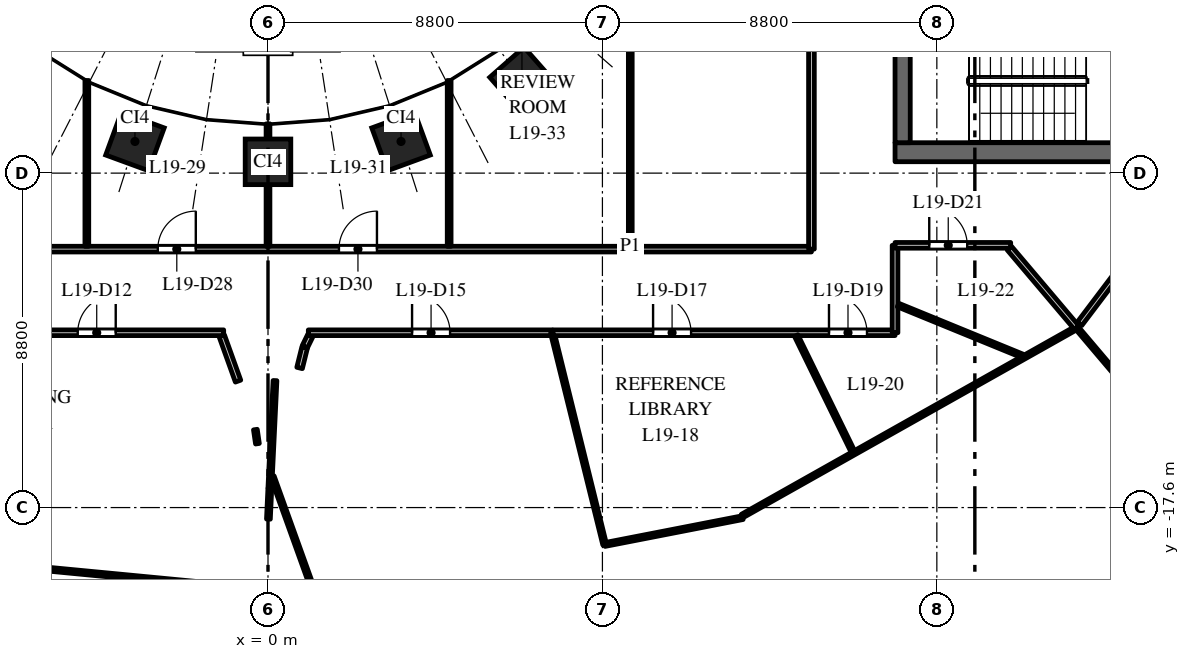
"""IFC4 building model, lengths in metres.
Left out: names, types, materials, properties, quantities, classifications, styles, units other than length and angle.
Written with IfcOpenShell. Run it as: python <this file> out.ifc"""

import sys

from ifc_helpers import new_model, si_unit, direction, frame, frame_2d, origin, origin_2d, place, context, subcontext, project, spatial, rectangle, extrude, element, fill, save


model = new_model("IFC4")
c1 = context("Model", 3, precision=1e-05, world=origin(), true_north=direction((0.0, 1.0)))
c2 = subcontext(c1, "Body", "Model", "MODEL_VIEW")
j1 = project(units=[si_unit("LENGTHUNIT", "METRE"), si_unit("PLANEANGLEUNIT", "RADIAN")], contexts=[c1])
p1 = place(None, origin())
s1 = spatial("IfcSite", under=j1, at=p1, CompositionType="ELEMENT")
p2 = place(p1, origin())
s2 = spatial("IfcBuilding", under=s1, at=p2, CompositionType="ELEMENT")
p3 = place(p2, frame((0.0, 0.0, 88.0)))
s3 = spatial("IfcBuildingStorey", under=s2, at=p3, CompositionType="ELEMENT", Elevation=88.0)
for number, where, z_axis, x_axis in (
    (1, (-3.501, -7.967, 0.0), (0.0, 0.0, 1.0), (0.939, -0.344, 0.0)),
    (2, (0.0, -8.503, 0.0), (0.0, 0.0, 1.0), (1.0, 0.0, 0.0)),
    (3, (3.501, -7.967, 0.0), (0.0, 0.0, 1.0), (0.939, 0.344, 0.0)),
    (4, (6.682, -6.334, 0.0), (0.0, 0.0, 1.0), (0.751, 0.66, 0.0)),
):
    element("IfcColumn", number, at=place(p3, frame(where, z_axis=z_axis, x_axis=x_axis)), inside=s3, PredefinedType="COLUMN", context=c2, shape_type="SweptSolid", body=[
        extrude(rectangle(XDim=1.2, YDim=1.2, at=origin_2d()), origin(), (0.0, 0.0, 1.0), 4.0),
    ])
p4 = place(p3, frame((16.5, -8.25, 0.0), z_axis=(0.0, 0.0, 1.0), x_axis=(1.0, 0.0, 0.0)))
e5 = element("IfcWall", 5, at=p4, inside=s3, PredefinedType="SHEAR", context=c2, shape_type="SweptSolid", body=[
    extrude(rectangle(XDim=15.0, YDim=0.5, at=frame_2d((7.5, 0.0))), origin(), (0.0, 0.0, 1.0), 3.7),
])
p5 = place(p4, frame((6.9, 0.0, 0.0)))
e6 = element("IfcOpeningElement", 6, at=p5, cuts=e5, PredefinedType="OPENING", context=c2, shape_type="SweptSolid", body=[
    extrude(rectangle(XDim=1.2, YDim=2.1, at=frame_2d((0.6, 1.05))), frame((0.0, 0.26, 0.0), z_axis=(0.0, -1.0, 0.0), x_axis=(1.0, 0.0, 0.0)), (0.0, 0.0, 1.0), 0.52),
])
p6 = place(p4, frame((12.275, 0.0, 0.0)))
e7 = element("IfcOpeningElement", 7, at=p6, cuts=e5, PredefinedType="OPENING", context=c2, shape_type="SweptSolid", body=[
    extrude(rectangle(XDim=0.9, YDim=2.1, at=frame_2d((0.45, 1.05))), frame((0.0, 0.26, 0.0), z_axis=(0.0, -1.0, 0.0), x_axis=(1.0, 0.0, 0.0)), (0.0, 0.0, 1.0), 0.52),
])
p7 = place(p3, frame((16.7, -8.0, 0.0), z_axis=(0.0, 0.0, 1.0), x_axis=(0.0, 1.0, 0.0)))
e8 = element("IfcWall", 8, at=p7, inside=s3, PredefinedType="SHEAR", context=c2, shape_type="SweptSolid", body=[
    extrude(rectangle(XDim=16.0, YDim=0.4, at=frame_2d((8.0, 0.0))), origin(), (0.0, 0.0, 1.0), 3.7),
])
p8 = place(p3, frame((-14.3, -10.8, 0.0), z_axis=(0.0, 0.0, 1.0), x_axis=(1.0, 0.0, 0.0)))
e9 = element("IfcWall", 9, at=p8, inside=s3, PredefinedType="PARTITIONING", context=c2, shape_type="SweptSolid", body=[
    extrude(rectangle(XDim=28.6, YDim=0.15, at=frame_2d((14.3, 0.0))), origin(), (0.0, 0.0, 1.0), 2.85),
])
p9 = place(p8, frame((11.4, 0.0, 0.0)))
e10 = element("IfcOpeningElement", 10, at=p9, cuts=e9, PredefinedType="OPENING", context=c2, shape_type="SweptSolid", body=[
    extrude(rectangle(XDim=1.0, YDim=2.1, at=frame_2d((0.5, 1.05))), frame((0.0, 0.085, 0.0), z_axis=(0.0, -1.0, 0.0), x_axis=(1.0, 0.0, 0.0)), (0.0, 0.0, 1.0), 0.17),
])
p10 = place(p8, frame((16.167, 0.0, 0.0)))
e11 = element("IfcOpeningElement", 11, at=p10, cuts=e9, PredefinedType="OPENING", context=c2, shape_type="SweptSolid", body=[
    extrude(rectangle(XDim=1.0, YDim=2.1, at=frame_2d((0.5, 1.05))), frame((0.0, 0.085, 0.0), z_axis=(0.0, -1.0, 0.0), x_axis=(1.0, 0.0, 0.0)), (0.0, 0.0, 1.0), 0.17),
])
p11 = place(p3, frame((-8.802, -18.932, 0.0), z_axis=(0.0, 0.0, 1.0), x_axis=(0.99543910623, -0.095399086939, 0.0)))
e12 = element("IfcWall", 12, at=p11, inside=s3, PredefinedType="PARTITIONING", context=c2, shape_type="SweptSolid", body=[
    extrude(rectangle(XDim=8.24, YDim=0.1, at=frame_2d((4.12, 0.0))), origin(), (0.0, 0.0, 1.0), 2.85),
])
p12 = place(p3, frame((-7.767, -13.0, 0.0), z_axis=(0.0, 0.0, 1.0), x_axis=(1.0, 0.0, 0.0)))
e13 = element("IfcWall", 13, at=p12, inside=s3, PredefinedType="PARTITIONING", context=c2, shape_type="SweptSolid", body=[
    extrude(rectangle(XDim=6.601, YDim=0.15, at=frame_2d((3.301, 0.0))), origin(), (0.0, 0.0, 1.0), 2.85),
])
p13 = place(p12, frame((2.76, 0.0, 0.0)))
e14 = element("IfcOpeningElement", 14, at=p13, cuts=e13, PredefinedType="OPENING", context=c2, shape_type="SweptSolid", body=[
    extrude(rectangle(XDim=1.0, YDim=2.1, at=frame_2d((0.5, 1.05))), frame((0.0, 0.085, 0.0), z_axis=(0.0, -1.0, 0.0), x_axis=(1.0, 0.0, 0.0)), (0.0, 0.0, 1.0), 0.17),
])
p14 = place(p3, frame((-4.767, -10.725, 0.0), z_axis=(0.0, 0.0, 1.0), x_axis=(0.0, 1.0, 0.0)))
e15 = element("IfcWall", 15, at=p14, inside=s3, PredefinedType="PARTITIONING", context=c2, shape_type="SweptSolid", body=[
    extrude(rectangle(XDim=4.362, YDim=0.1, at=frame_2d((2.181, 0.0))), origin(), (0.0, 0.0, 1.0), 2.9),
])
p15 = place(p3, frame((-1.217, -13.079, 0.0), z_axis=(0.0, 0.0, 1.0), x_axis=(0.338140136535, -0.941095769868, 0.0)))
e16 = element("IfcWall", 16, at=p15, inside=s3, PredefinedType="PARTITIONING", context=c2, shape_type="SweptSolid", body=[
    extrude(rectangle(XDim=1.269, YDim=0.15, at=frame_2d((0.634, 0.0))), origin(), (0.0, 0.0, 1.0), 2.85),
])
p16 = place(p3, frame((-0.332, -15.548, 0.0), z_axis=(0.0, 0.0, 1.0), x_axis=(0.143604317757, -0.989635185269, 0.0)))
e17 = element("IfcWall", 17, at=p16, inside=s3, PredefinedType="PARTITIONING", context=c2, shape_type="SweptSolid", body=[
    extrude(rectangle(XDim=0.376, YDim=0.1, at=frame_2d((0.188, 0.0))), origin(), (0.0, 0.0, 1.0), 3.7),
])
p17 = place(p3, frame((0.0, -10.725, 0.0), z_axis=(0.0, 0.0, 1.0), x_axis=(0.0, 1.0, 0.0)))
e18 = element("IfcWall", 18, at=p17, inside=s3, PredefinedType="PARTITIONING", context=c2, shape_type="SweptSolid", body=[
    extrude(rectangle(XDim=3.221, YDim=0.1, at=frame_2d((1.611, 0.0))), origin(), (0.0, 0.0, 1.0), 3.7),
])
p18 = place(p3, frame((0.011, -17.904, 0.0), z_axis=(0.0, 0.0, 1.0), x_axis=(0.046221474857, 0.998931216482, 0.0)))
e19 = element("IfcWall", 19, at=p18, inside=s3, PredefinedType="PARTITIONING", context=c2, shape_type="SweptSolid", body=[
    extrude(rectangle(XDim=0.803, YDim=0.1, at=frame_2d((0.401, 0.0))), origin(), (0.0, 0.0, 1.0), 3.7),
])
p19 = place(p3, frame((0.049, -17.087, 0.0), z_axis=(0.0, 0.0, 1.0), x_axis=(0.047688063475, 0.998862277094, 0.0)))
e20 = element("IfcWall", 20, at=p19, inside=s3, PredefinedType="PARTITIONING", context=c2, shape_type="SweptSolid", body=[
    extrude(rectangle(XDim=2.831, YDim=0.1, at=frame_2d((1.416, 0.0))), origin(), (0.0, 0.0, 1.0), 3.7),
])
p20 = place(p3, frame((0.113, -16.782, 0.0), z_axis=(0.0, 0.0, 1.0), x_axis=(0.338468220543, -0.940977823162, 0.0)))
e21 = element("IfcWall", 21, at=p20, inside=s3, PredefinedType="PARTITIONING", context=c2, shape_type="SweptSolid", body=[
    extrude(rectangle(XDim=5.265, YDim=0.1, at=frame_2d((2.632, 0.0))), origin(), (0.0, 0.0, 1.0), 3.7),
])
p21 = place(p3, frame((0.831, -13.927, 0.0), z_axis=(0.0, 0.0, 1.0), x_axis=(0.240473799965, 0.970655629732, 0.0)))
e22 = element("IfcWall", 22, at=p21, inside=s3, PredefinedType="PARTITIONING", context=c2, shape_type="SweptSolid", body=[
    extrude(rectangle(XDim=0.557, YDim=0.15, at=frame_2d((0.279, 0.0))), origin(), (0.0, 0.0, 1.0), 3.7),
])
p22 = place(p3, frame((0.969, -13.369, 0.0), z_axis=(0.0, 0.0, 1.0), x_axis=(0.440240923942, 0.897879685084, 0.0)))
e23 = element("IfcWall", 23, at=p22, inside=s3, PredefinedType="PARTITIONING", context=c2, shape_type="SweptSolid", body=[
    extrude(rectangle(XDim=0.323, YDim=0.15, at=frame_2d((0.161, 0.0))), origin(), (0.0, 0.0, 1.0), 3.7),
])
p23 = place(p3, frame((1.061, -13.0, 0.0), z_axis=(0.0, 0.0, 1.0), x_axis=(1.0, 0.0, 0.0)))
e24 = element("IfcWall", 24, at=p23, inside=s3, PredefinedType="PARTITIONING", context=c2, shape_type="SweptSolid", body=[
    extrude(rectangle(XDim=6.422, YDim=0.15, at=frame_2d((3.211, 0.0))), origin(), (0.0, 0.0, 1.0), 2.85),
])
p24 = place(p23, frame((2.73, 0.0, 0.0)))
e25 = element("IfcOpeningElement", 25, at=p24, cuts=e24, PredefinedType="OPENING", context=c2, shape_type="SweptSolid", body=[
    extrude(rectangle(XDim=1.0, YDim=2.1, at=frame_2d((0.5, 1.05))), frame((0.0, 0.085, 0.0), z_axis=(0.0, -1.0, 0.0), x_axis=(1.0, 0.0, 0.0)), (0.0, 0.0, 1.0), 0.17),
])
p25 = place(p3, frame((4.767, -10.725, 0.0), z_axis=(0.0, 0.0, 1.0), x_axis=(0.0, 1.0, 0.0)))
e26 = element("IfcWall", 26, at=p25, inside=s3, PredefinedType="PARTITIONING", context=c2, shape_type="SweptSolid", body=[
    extrude(rectangle(XDim=4.362, YDim=0.1, at=frame_2d((2.181, 0.0))), origin(), (0.0, 0.0, 1.0), 2.85),
])
p26 = place(p3, frame((7.483, -13.0, 0.0), z_axis=(0.0, 0.0, 1.0), x_axis=(0.239702552944, -0.970846376165, 0.0)))
e27 = element("IfcWall", 27, at=p26, inside=s3, PredefinedType="PARTITIONING", context=c2, shape_type="SweptSolid", body=[
    extrude(rectangle(XDim=5.74, YDim=0.1, at=frame_2d((2.87, 0.0))), origin(), (0.0, 0.0, 1.0), 3.7),
])
p27 = place(p3, frame((7.499, -13.0, 0.0), z_axis=(0.0, 0.0, 1.0), x_axis=(1.0, 0.0, 0.0)))
e28 = element("IfcWall", 28, at=p27, inside=s3, PredefinedType="PARTITIONING", context=c2, shape_type="SweptSolid", body=[
    extrude(rectangle(XDim=9.001, YDim=0.15, at=frame_2d((4.5, 0.0))), origin(), (0.0, 0.0, 1.0), 2.85),
])
p28 = place(p27, frame((2.634, 0.0, 0.0)))
e29 = element("IfcOpeningElement", 29, at=p28, cuts=e28, PredefinedType="OPENING", context=c2, shape_type="SweptSolid", body=[
    extrude(rectangle(XDim=1.0, YDim=2.1, at=frame_2d((0.5, 1.05))), frame((0.0, 0.085, 0.0), z_axis=(0.0, -1.0, 0.0), x_axis=(1.0, 0.0, 0.0)), (0.0, 0.0, 1.0), 0.17),
])
p29 = place(p27, frame((7.263, 0.0, 0.0)))
e30 = element("IfcOpeningElement", 30, at=p29, cuts=e28, PredefinedType="OPENING", context=c2, shape_type="SweptSolid", body=[
    extrude(rectangle(XDim=1.0, YDim=2.1, at=frame_2d((0.5, 1.05))), frame((0.0, 0.085, 0.0), z_axis=(0.0, -1.0, 0.0), x_axis=(1.0, 0.0, 0.0)), (0.0, 0.0, 1.0), 0.17),
])
p30 = place(p3, frame((8.859, -18.573, 0.0), z_axis=(0.0, 0.0, 1.0), x_axis=(0.981554610727, 0.191181971328, 0.0)))
e31 = element("IfcWall", 31, at=p30, inside=s3, PredefinedType="PARTITIONING", context=c2, shape_type="SweptSolid", body=[
    extrude(rectangle(XDim=3.703, YDim=0.1, at=frame_2d((1.852, 0.0))), origin(), (0.0, 0.0, 1.0), 2.85),
])
p31 = place(p3, frame((9.533, -10.725, 0.0), z_axis=(0.0, 0.0, 1.0), x_axis=(0.0, 1.0, 0.0)))
e32 = element("IfcWall", 32, at=p31, inside=s3, PredefinedType="PARTITIONING", context=c2, shape_type="SweptSolid", body=[
    extrude(rectangle(XDim=21.45, YDim=0.1, at=frame_2d((10.725, 0.0))), origin(), (0.0, 0.0, 1.0), 2.75),
])
p32 = place(p3, frame((12.478, -17.822, 0.0), z_axis=(0.0, 0.0, 1.0), x_axis=(0.871366973315, 0.490631835306, 0.0)))
e33 = element("IfcWall", 33, at=p32, inside=s3, PredefinedType="PARTITIONING", context=c2, shape_type="SweptSolid", body=[
    extrude(rectangle(XDim=10.101, YDim=0.1, at=frame_2d((5.051, 0.0))), origin(), (0.0, 0.0, 1.0), 3.7),
])
p33 = place(p3, frame((13.899, -13.075, 0.0), z_axis=(0.0, 0.0, 1.0), x_axis=(0.439170148288, -0.898403907412, 0.0)))
e34 = element("IfcWall", 34, at=p33, inside=s3, PredefinedType="PARTITIONING", context=c2, shape_type="SweptSolid", body=[
    extrude(rectangle(XDim=3.395, YDim=0.1, at=frame_2d((1.698, 0.0))), origin(), (0.0, 0.0, 1.0), 3.7),
])
p34 = place(p3, frame((14.3, -10.8, 0.0), z_axis=(0.0, 0.0, 1.0), x_axis=(0.0, 1.0, 0.0)))
e35 = element("IfcWall", 35, at=p34, inside=s3, PredefinedType="PARTITIONING", context=c2, shape_type="SweptSolid", body=[
    extrude(rectangle(XDim=21.6, YDim=0.15, at=frame_2d((10.8, 0.0))), origin(), (0.0, 0.0, 1.0), 2.75),
])
p35 = place(p34, frame((10.2, 0.0, 0.0)))
e36 = element("IfcOpeningElement", 36, at=p35, cuts=e35, PredefinedType="OPENING", context=c2, shape_type="SweptSolid", body=[
    extrude(rectangle(XDim=1.0, YDim=2.1, at=frame_2d((0.5, 1.05))), frame((0.0, 0.085, 0.0), z_axis=(0.0, -1.0, 0.0), x_axis=(1.0, 0.0, 0.0)), (0.0, 0.0, 1.0), 0.17),
])
p36 = place(p3, frame((16.5, -13.0, 0.0), z_axis=(0.0, 0.0, 1.0), x_axis=(0.0, 1.0, 0.0)))
e37 = element("IfcWall", 37, at=p36, inside=s3, PredefinedType="PARTITIONING", context=c2, shape_type="SweptSolid", body=[
    extrude(rectangle(XDim=2.3, YDim=0.15, at=frame_2d((1.15, 0.0))), origin(), (0.0, 0.0, 1.0), 3.7),
])
p37 = place(p3, frame((16.5, -10.7, 0.0), z_axis=(0.0, 0.0, 1.0), x_axis=(1.0, 0.0, 0.0)))
e38 = element("IfcWall", 38, at=p37, inside=s3, PredefinedType="PARTITIONING", context=c2, shape_type="SweptSolid", body=[
    extrude(rectangle(XDim=3.043, YDim=0.15, at=frame_2d((1.521, 0.0))), origin(), (0.0, 0.0, 1.0), 3.7),
])
p38 = place(p37, frame((0.9, 0.0, 0.0)))
e39 = element("IfcOpeningElement", 39, at=p38, cuts=e38, PredefinedType="OPENING", context=c2, shape_type="SweptSolid", body=[
    extrude(rectangle(XDim=1.0, YDim=2.1, at=frame_2d((0.5, 1.05))), frame((0.0, 0.085, 0.0), z_axis=(0.0, -1.0, 0.0), x_axis=(1.0, 0.0, 0.0)), (0.0, 0.0, 1.0), 0.17),
])
p39 = place(p3, frame((16.579, -12.271, 0.0), z_axis=(0.0, 0.0, 1.0), x_axis=(0.925511782592, -0.378718814272, 0.0)))
e40 = element("IfcWall", 40, at=p39, inside=s3, PredefinedType="PARTITIONING", context=c2, shape_type="SweptSolid", body=[
    extrude(rectangle(XDim=3.539, YDim=0.1, at=frame_2d((1.769, 0.0))), origin(), (0.0, 0.0, 1.0), 3.7),
])
p40 = place(p3, frame((19.511, -10.778, 0.0), z_axis=(0.0, 0.0, 1.0), x_axis=(0.64641426768, -0.762986628021, 0.0)))
e41 = element("IfcWall", 41, at=p40, inside=s3, PredefinedType="PARTITIONING", context=c2, shape_type="SweptSolid", body=[
    extrude(rectangle(XDim=2.735, YDim=0.15, at=frame_2d((1.368, 0.0))), origin(), (0.0, 0.0, 1.0), 3.7),
])
p41 = place(p3, frame((21.355, -12.765, 0.0), z_axis=(0.0, 0.0, 1.0), x_axis=(0.603391001626, 0.797445483502, 0.0)))
e42 = element("IfcWall", 42, at=p41, inside=s3, PredefinedType="PARTITIONING", context=c2, shape_type="SweptSolid", body=[
    extrude(rectangle(XDim=2.68, YDim=0.15, at=frame_2d((1.34, 0.0))), origin(), (0.0, 0.0, 1.0), 2.75),
])
p42 = place(p3, frame((21.279, -12.865, 0.0), z_axis=(0.0, 0.0, 1.0), x_axis=(0.646395355102, -0.763002650652, 0.0)))
e43 = element("IfcWall", 43, at=p42, inside=s3, PredefinedType="PARTITIONING", context=c2, shape_type="SweptSolid", body=[
    extrude(rectangle(XDim=7.969, YDim=0.1, at=frame_2d((3.984, 0.0))), origin(), (0.0, 0.0, 1.0), 2.9),
])
p43 = place(p13, origin())
e44 = element("IfcDoor", 44, at=p43, inside=s3, OperationType="SINGLE_SWING_RIGHT", PredefinedType="DOOR", context=c2, shape_type="SweptSolid", body=[
    extrude(rectangle(XDim=1.0, YDim=2.1, at=frame_2d((0.5, 1.05))), frame((0.0, 0.025, 0.0), z_axis=(0.0, -1.0, 0.0), x_axis=(1.0, 0.0, 0.0)), (0.0, 0.0, 1.0), 0.05),
])
fill(e14, e44)
p44 = place(p24, origin())
e45 = element("IfcDoor", 45, at=p44, inside=s3, OperationType="SINGLE_SWING_LEFT", PredefinedType="DOOR", context=c2, shape_type="SweptSolid", body=[
    extrude(rectangle(XDim=1.0, YDim=2.1, at=frame_2d((0.5, 1.05))), frame((0.0, 0.025, 0.0), z_axis=(0.0, -1.0, 0.0), x_axis=(1.0, 0.0, 0.0)), (0.0, 0.0, 1.0), 0.05),
])
fill(e25, e45)
p45 = place(p28, origin())
e46 = element("IfcDoor", 46, at=p45, inside=s3, OperationType="SINGLE_SWING_LEFT", PredefinedType="DOOR", context=c2, shape_type="SweptSolid", body=[
    extrude(rectangle(XDim=1.0, YDim=2.1, at=frame_2d((0.5, 1.05))), frame((0.0, 0.025, 0.0), z_axis=(0.0, -1.0, 0.0), x_axis=(1.0, 0.0, 0.0)), (0.0, 0.0, 1.0), 0.05),
])
fill(e29, e46)
p46 = place(p29, origin())
e47 = element("IfcDoor", 47, at=p46, inside=s3, OperationType="SINGLE_SWING_LEFT", PredefinedType="DOOR", context=c2, shape_type="SweptSolid", body=[
    extrude(rectangle(XDim=1.0, YDim=2.1, at=frame_2d((0.5, 1.05))), frame((0.0, 0.025, 0.0), z_axis=(0.0, -1.0, 0.0), x_axis=(1.0, 0.0, 0.0)), (0.0, 0.0, 1.0), 0.05),
])
fill(e30, e47)
p47 = place(p38, origin())
e48 = element("IfcDoor", 48, at=p47, inside=s3, OperationType="SINGLE_SWING_LEFT", PredefinedType="DOOR", context=c2, shape_type="SweptSolid", body=[
    extrude(rectangle(XDim=1.0, YDim=2.1, at=frame_2d((0.5, 1.05))), frame((0.0, 0.025, 0.0), z_axis=(0.0, -1.0, 0.0), x_axis=(1.0, 0.0, 0.0)), (0.0, 0.0, 1.0), 0.05),
])
fill(e39, e48)
p48 = place(p9, origin())
e49 = element("IfcDoor", 49, at=p48, inside=s3, OperationType="SINGLE_SWING_RIGHT", PredefinedType="DOOR", context=c2, shape_type="SweptSolid", body=[
    extrude(rectangle(XDim=1.0, YDim=2.1, at=frame_2d((0.5, 1.05))), frame((0.0, 0.025, 0.0), z_axis=(0.0, -1.0, 0.0), x_axis=(1.0, 0.0, 0.0)), (0.0, 0.0, 1.0), 0.05),
])
fill(e10, e49)
p49 = place(p10, origin())
e50 = element("IfcDoor", 50, at=p49, inside=s3, OperationType="SINGLE_SWING_RIGHT", PredefinedType="DOOR", context=c2, shape_type="SweptSolid", body=[
    extrude(rectangle(XDim=1.0, YDim=2.1, at=frame_2d((0.5, 1.05))), frame((0.0, 0.025, 0.0), z_axis=(0.0, -1.0, 0.0), x_axis=(1.0, 0.0, 0.0)), (0.0, 0.0, 1.0), 0.05),
])
fill(e11, e50)
save(model, sys.argv[1])
